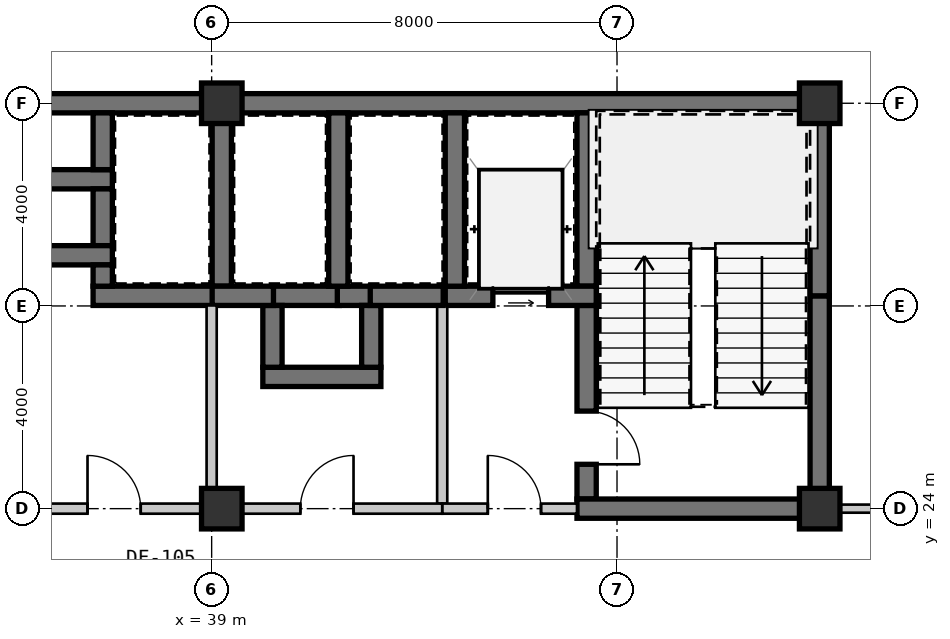
"""IFC4 building model, lengths in metres.
Left out: names, types, materials, properties, quantities, classifications, styles, units other than length and angle.
Written with IfcOpenShell. Run it as: python <this file> out.ifc"""

import sys

from ifc_helpers import new_model, si_unit, direction, frame, frame_2d, origin, origin_2d, place, context, subcontext, project, spatial, rectangle, extrude, source, transform, mapped, element, fill, save


model = new_model("IFC4")
c1 = context("Model", 3, precision=1e-05, world=origin(), true_north=direction((0.0, 1.0)))
c2 = subcontext(c1, "Body", "Model", "MODEL_VIEW")
j1 = project(units=[si_unit("LENGTHUNIT", "METRE"), si_unit("PLANEANGLEUNIT", "RADIAN")], contexts=[c1])
p1 = place(None, origin())
s1 = spatial("IfcSite", under=j1, at=p1, CompositionType="ELEMENT")
p2 = place(p1, origin())
s2 = spatial("IfcBuilding", under=s1, at=p2, CompositionType="ELEMENT")
p3 = place(p2, frame((0.0, 0.0, 38.85)))
s3 = spatial("IfcBuildingStorey", under=s2, at=p3, CompositionType="ELEMENT", Elevation=38.85)
m1 = source(origin(), c2, "Body", "SweptSolid", [
    extrude(rectangle(XDim=0.8, YDim=0.8, at=origin_2d()), origin(), (0.0, 0.0, 1.0), 3.15),
])
for number, where, z_axis, x_axis in (
    (1, (39.2, 24.0, 0.0), (0.0, 0.0, 1.0), (1.0, 0.0, 0.0)),
    (2, (51.0, 24.0, 0.0), (0.0, 0.0, 1.0), (1.0, 0.0, 0.0)),
    (3, (39.2, 32.0, 0.0), (0.0, 0.0, 1.0), (1.0, 0.0, 0.0)),
    (4, (51.0, 32.0, 0.0), (0.0, 0.0, 1.0), (1.0, 0.0, 0.0)),
):
    element("IfcColumn", number, at=place(p3, frame(where, z_axis=z_axis, x_axis=x_axis)), inside=s3, PredefinedType="COLUMN", context=c2, shape_type="MappedRepresentation", body=[
        mapped(m1, transform((0.0, 0.0, 0.0), scale=1.0)),
    ])
m2 = source(origin(), c2, "Body", "SweptSolid", [
    extrude(rectangle(XDim=11.2, YDim=0.38, at=frame_2d((5.6, 0.0))), origin(), (0.0, 0.0, 1.0), 2.93),
])
p4 = place(p3, frame((28.0, 32.0, 0.0), z_axis=(0.0, 0.0, 1.0), x_axis=(1.0, 0.0, 0.0)))
e5 = element("IfcWall", 5, at=p4, inside=s3, PredefinedType="SHEAR", context=c2, shape_type="MappedRepresentation", body=[
    mapped(m2, transform((0.0, 0.0, 0.0), scale=1.0)),
])
m3 = source(origin(), c2, "Body", "SweptSolid", [
    extrude(rectangle(XDim=11.99, YDim=0.38, at=frame_2d((5.995, 0.0))), origin(), (0.0, 0.0, 1.0), 2.93),
])
p5 = place(p3, frame((39.2, 32.0, 0.0), z_axis=(0.0, 0.0, 1.0), x_axis=(1.0, 0.0, 0.0)))
e6 = element("IfcWall", 6, at=p5, inside=s3, PredefinedType="SHEAR", context=c2, shape_type="MappedRepresentation", body=[
    mapped(m3, transform((0.0, 0.0, 0.0), scale=1.0)),
])
m4 = source(origin(), c2, "Body", "SweptSolid", [
    extrude(rectangle(XDim=4.01, YDim=0.38, at=frame_2d((2.005, 0.0))), origin(), (0.0, 0.0, 1.0), 2.93),
])
p6 = place(p3, frame((51.0, 24.19, 0.0), z_axis=(0.0, 0.0, 1.0), x_axis=(0.0, 1.0, 0.0)))
e7 = element("IfcWall", 7, at=p6, inside=s3, PredefinedType="SHEAR", context=c2, shape_type="MappedRepresentation", body=[
    mapped(m4, transform((0.0, 0.0, 0.0), scale=1.0)),
])
m5 = source(origin(), c2, "Body", "SweptSolid", [
    extrude(rectangle(XDim=3.61, YDim=0.38, at=frame_2d((1.805, 0.0))), origin(), (0.0, 0.0, 1.0), 2.93),
])
p7 = place(p3, frame((51.0, 28.2, 0.0), z_axis=(0.0, 0.0, 1.0), x_axis=(0.0, 1.0, 0.0)))
e8 = element("IfcWall", 8, at=p7, inside=s3, PredefinedType="SHEAR", context=c2, shape_type="MappedRepresentation", body=[
    mapped(m5, transform((0.0, 0.0, 0.0), scale=1.0)),
])
m6 = source(origin(), c2, "Body", "SweptSolid", [
    extrude(rectangle(XDim=3.42, YDim=0.38, at=frame_2d((1.71, 0.0))), origin(), (0.0, 0.0, 1.0), 2.93),
])
p8 = place(p3, frame((46.4, 31.81, 0.0), z_axis=(0.0, 0.0, 1.0), x_axis=(0.0, -1.0, 0.0)))
e9 = element("IfcWall", 9, at=p8, inside=s3, PredefinedType="SHEAR", context=c2, shape_type="MappedRepresentation", body=[
    mapped(m6, transform((0.0, 0.0, 0.0), scale=1.0)),
])
m7 = source(origin(), c2, "Body", "SweptSolid", [
    extrude(rectangle(XDim=3.82, YDim=0.38, at=frame_2d((1.91, 0.0))), origin(), (0.0, 0.0, 1.0), 2.93),
])
p9 = place(p3, frame((46.4, 28.01, 0.0), z_axis=(0.0, 0.0, 1.0), x_axis=(0.0, -1.0, 0.0)))
e10 = element("IfcWall", 10, at=p9, inside=s3, PredefinedType="SHEAR", context=c2, shape_type="MappedRepresentation", body=[
    mapped(m7, transform((0.0, 0.0, 0.0), scale=1.0)),
])
m8 = source(origin(), c2, "Body", "SweptSolid", [
    extrude(rectangle(XDim=1.05, YDim=2.1, at=frame_2d((0.525, 1.05))), frame((0.0, 0.2, 0.0), z_axis=(0.0, -1.0, 0.0), x_axis=(1.0, 0.0, 0.0)), (0.0, 0.0, 1.0), 0.4),
])
p10 = place(p9, frame((2.085, 0.0, 0.0)))
e11 = element("IfcOpeningElement", 11, at=p10, cuts=e10, PredefinedType="OPENING", context=c2, shape_type="MappedRepresentation", body=[
    mapped(m8, transform((0.0, 0.0, 0.0), scale=1.0)),
])
m9 = source(origin(), c2, "Body", "SweptSolid", [
    extrude(rectangle(XDim=4.98, YDim=0.38, at=frame_2d((2.49, 0.0))), origin(), (0.0, 0.0, 1.0), 2.93),
])
p11 = place(p3, frame((46.21, 24.0, 0.0), z_axis=(0.0, 0.0, 1.0), x_axis=(1.0, 0.0, 0.0)))
e12 = element("IfcWall", 12, at=p11, inside=s3, PredefinedType="SHEAR", context=c2, shape_type="MappedRepresentation", body=[
    mapped(m9, transform((0.0, 0.0, 0.0), scale=1.0)),
])
m10 = source(origin(), c2, "Body", "SweptSolid", [
    extrude(rectangle(XDim=2.98, YDim=0.38, at=frame_2d((1.49, 0.0))), origin(), (0.0, 0.0, 1.0), 2.93),
])
p12 = place(p3, frame((43.61, 28.2, 0.0), z_axis=(0.0, 0.0, 1.0), x_axis=(1.0, 0.0, 0.0)))
e13 = element("IfcWall", 13, at=p12, inside=s3, PredefinedType="SHEAR", context=c2, shape_type="MappedRepresentation", body=[
    mapped(m10, transform((0.0, 0.0, 0.0), scale=1.0)),
])
m11 = source(origin(), c2, "Body", "SweptSolid", [
    extrude(rectangle(XDim=1.1, YDim=2.15, at=frame_2d((0.55, 1.075))), frame((0.0, 0.2, 0.0), z_axis=(0.0, -1.0, 0.0), x_axis=(1.0, 0.0, 0.0)), (0.0, 0.0, 1.0), 0.4),
])
p13 = place(p12, frame((0.94, 0.0, 0.0)))
e14 = element("IfcOpeningElement", 14, at=p13, cuts=e13, PredefinedType="OPENING", context=c2, shape_type="MappedRepresentation", body=[
    mapped(m11, transform((0.0, 0.0, 0.0), scale=1.0)),
])
p14 = place(p3, frame((43.8, 31.81, 0.0), z_axis=(0.0, 0.0, 1.0), x_axis=(0.0, -1.0, 0.0)))
e15 = element("IfcWall", 15, at=p14, inside=s3, PredefinedType="SHEAR", context=c2, shape_type="MappedRepresentation", body=[
    mapped(m6, transform((0.0, 0.0, 0.0), scale=1.0)),
])
m12 = source(origin(), c2, "Body", "SweptSolid", [
    extrude(rectangle(XDim=3.91, YDim=0.2, at=frame_2d((1.955, 0.0))), origin(), (0.0, 0.0, 1.0), 2.93),
])
p15 = place(p3, frame((43.55, 28.01, 0.0), z_axis=(0.0, 0.0, 1.0), x_axis=(0.0, -1.0, 0.0)))
e16 = element("IfcWall", 16, at=p15, inside=s3, PredefinedType="SOLIDWALL", context=c2, shape_type="MappedRepresentation", body=[
    mapped(m12, transform((0.0, 0.0, 0.0), scale=1.0)),
])
m13 = source(origin(), c2, "Body", "SweptSolid", [
    extrude(rectangle(XDim=2.66, YDim=0.2, at=frame_2d((1.33, 0.0))), origin(), (0.0, 0.0, 1.0), 2.397),
])
p16 = place(p3, frame((43.55, 24.0, 0.0), z_axis=(0.0, 0.0, 1.0), x_axis=(1.0, 0.0, 0.0)))
e17 = element("IfcWall", 17, at=p16, inside=s3, PredefinedType="SOLIDWALL", context=c2, shape_type="MappedRepresentation", body=[
    mapped(m13, transform((0.0, 0.0, 0.0), scale=1.0)),
])
m14 = source(origin(), c2, "Body", "SweptSolid", [
    extrude(rectangle(XDim=1.05, YDim=2.1, at=frame_2d((0.525, 1.05))), frame((0.0, 0.11, 0.0), z_axis=(0.0, -1.0, 0.0), x_axis=(1.0, 0.0, 0.0)), (0.0, 0.0, 1.0), 0.22),
])
p17 = place(p16, frame((0.9, 0.0, 0.0)))
e18 = element("IfcOpeningElement", 18, at=p17, cuts=e17, PredefinedType="OPENING", context=c2, shape_type="MappedRepresentation", body=[
    mapped(m14, transform((0.0, 0.0, 0.0), scale=1.0)),
])
m15 = source(origin(), c2, "Body", "SweptSolid", [
    extrude(rectangle(XDim=2.08, YDim=0.38, at=frame_2d((1.04, 0.0))), origin(), (0.0, 0.0, 1.0), 2.93),
])
p18 = place(p3, frame((34.96, 30.5, 0.0), z_axis=(0.0, 0.0, 1.0), x_axis=(1.0, 0.0, 0.0)))
e19 = element("IfcWall", 19, at=p18, inside=s3, PredefinedType="SHEAR", context=c2, shape_type="MappedRepresentation", body=[
    mapped(m15, transform((0.0, 0.0, 0.0), scale=1.0)),
])
m16 = source(origin(), c2, "Body", "SweptSolid", [
    extrude(rectangle(XDim=1.12, YDim=0.38, at=frame_2d((0.56, 0.0))), origin(), (0.0, 0.0, 1.0), 2.93),
])
for number, where, z_axis, x_axis in (
    (20, (36.85, 30.69, 0.0), (0.0, 0.0, 1.0), (0.0, 1.0, 0.0)),
    (21, (36.85, 29.19, 0.0), (0.0, 0.0, 1.0), (0.0, 1.0, 0.0)),
):
    element("IfcWall", number, at=place(p3, frame(where, z_axis=z_axis, x_axis=x_axis)), inside=s3, PredefinedType="SHEAR", context=c2, shape_type="MappedRepresentation", body=[
        mapped(m16, transform((0.0, 0.0, 0.0), scale=1.0)),
    ])
p19 = place(p3, frame((34.96, 29.0, 0.0), z_axis=(0.0, 0.0, 1.0), x_axis=(1.0, 0.0, 0.0)))
e22 = element("IfcWall", 22, at=p19, inside=s3, PredefinedType="SHEAR", context=c2, shape_type="MappedRepresentation", body=[
    mapped(m15, transform((0.0, 0.0, 0.0), scale=1.0)),
])
m17 = source(origin(), c2, "Body", "SweptSolid", [
    extrude(rectangle(XDim=1.32, YDim=0.38, at=frame_2d((0.66, 0.0))), origin(), (0.0, 0.0, 1.0), 2.93),
])
p20 = place(p3, frame((41.52, 28.2, 0.0), z_axis=(0.0, 0.0, 1.0), x_axis=(-1.0, 0.0, 0.0)))
e23 = element("IfcWall", 23, at=p20, inside=s3, PredefinedType="SHEAR", context=c2, shape_type="MappedRepresentation", body=[
    mapped(m17, transform((0.0, 0.0, 0.0), scale=1.0)),
])
m18 = source(origin(), c2, "Body", "SweptSolid", [
    extrude(rectangle(XDim=0.67, YDim=0.38, at=frame_2d((0.335, 0.0))), origin(), (0.0, 0.0, 1.0), 2.93),
])
p21 = place(p3, frame((42.15, 28.2, 0.0), z_axis=(0.0, 0.0, 1.0), x_axis=(-1.0, 0.0, 0.0)))
e24 = element("IfcWall", 24, at=p21, inside=s3, PredefinedType="SHEAR", context=c2, shape_type="MappedRepresentation", body=[
    mapped(m18, transform((0.0, 0.0, 0.0), scale=1.0)),
])
m19 = source(origin(), c2, "Body", "SweptSolid", [
    extrude(rectangle(XDim=2.33, YDim=0.38, at=frame_2d((1.165, 0.0))), origin(), (0.0, 0.0, 1.0), 2.93),
])
p22 = place(p3, frame((40.01, 26.6, 0.0), z_axis=(0.0, 0.0, 1.0), x_axis=(1.0, 0.0, 0.0)))
e25 = element("IfcWall", 25, at=p22, inside=s3, PredefinedType="SHEAR", context=c2, shape_type="MappedRepresentation", body=[
    mapped(m19, transform((0.0, 0.0, 0.0), scale=1.0)),
])
m20 = source(origin(), c2, "Body", "SweptSolid", [
    extrude(rectangle(XDim=1.22, YDim=0.38, at=frame_2d((0.61, 0.0))), origin(), (0.0, 0.0, 1.0), 2.93),
])
for number, where, z_axis, x_axis in (
    (26, (40.2, 28.01, 0.0), (0.0, 0.0, 1.0), (0.0, -1.0, 0.0)),
    (27, (42.15, 26.79, 0.0), (0.0, 0.0, 1.0), (0.0, 1.0, 0.0)),
):
    element("IfcWall", number, at=place(p3, frame(where, z_axis=z_axis, x_axis=x_axis)), inside=s3, PredefinedType="SHEAR", context=c2, shape_type="MappedRepresentation", body=[
        mapped(m20, transform((0.0, 0.0, 0.0), scale=1.0)),
    ])
p23 = place(p3, frame((39.2, 28.39, 0.0), z_axis=(0.0, 0.0, 1.0), x_axis=(0.0, 1.0, 0.0)))
e28 = element("IfcWall", 28, at=p23, inside=s3, PredefinedType="SHEAR", context=c2, shape_type="MappedRepresentation", body=[
    mapped(m6, transform((0.0, 0.0, 0.0), scale=1.0)),
])
m21 = source(origin(), c2, "Body", "SweptSolid", [
    extrude(rectangle(XDim=2.36, YDim=0.38, at=frame_2d((1.18, 0.0))), origin(), (0.0, 0.0, 1.0), 2.93),
])
p24 = place(p3, frame((36.66, 28.2, 0.0), z_axis=(0.0, 0.0, 1.0), x_axis=(1.0, 0.0, 0.0)))
e29 = element("IfcWall", 29, at=p24, inside=s3, PredefinedType="SHEAR", context=c2, shape_type="MappedRepresentation", body=[
    mapped(m21, transform((0.0, 0.0, 0.0), scale=1.0)),
])
m22 = source(origin(), c2, "Body", "SweptSolid", [
    extrude(rectangle(XDim=0.42, YDim=0.38, at=frame_2d((0.21, 0.0))), origin(), (0.0, 0.0, 1.0), 2.93),
])
p25 = place(p3, frame((36.85, 28.81, 0.0), z_axis=(0.0, 0.0, 1.0), x_axis=(0.0, -1.0, 0.0)))
e30 = element("IfcWall", 30, at=p25, inside=s3, PredefinedType="SHEAR", context=c2, shape_type="MappedRepresentation", body=[
    mapped(m22, transform((0.0, 0.0, 0.0), scale=1.0)),
])
p26 = place(p3, frame((41.5, 28.39, 0.0), z_axis=(0.0, 0.0, 1.0), x_axis=(0.0, 1.0, 0.0)))
e31 = element("IfcWall", 31, at=p26, inside=s3, PredefinedType="SHEAR", context=c2, shape_type="MappedRepresentation", body=[
    mapped(m6, transform((0.0, 0.0, 0.0), scale=1.0)),
])
m23 = source(origin(), c2, "Body", "SweptSolid", [
    extrude(rectangle(XDim=1.21, YDim=0.38, at=frame_2d((0.605, 0.0))), origin(), (0.0, 0.0, 1.0), 2.93),
])
p27 = place(p3, frame((39.01, 28.2, 0.0), z_axis=(0.0, 0.0, 1.0), x_axis=(1.0, 0.0, 0.0)))
e32 = element("IfcWall", 32, at=p27, inside=s3, PredefinedType="SHEAR", context=c2, shape_type="MappedRepresentation", body=[
    mapped(m23, transform((0.0, 0.0, 0.0), scale=1.0)),
])
m24 = source(origin(), c2, "Body", "SweptSolid", [
    extrude(rectangle(XDim=1.44, YDim=0.38, at=frame_2d((0.72, 0.0))), origin(), (0.0, 0.0, 1.0), 2.93),
])
p28 = place(p3, frame((42.13, 28.2, 0.0), z_axis=(0.0, 0.0, 1.0), x_axis=(1.0, 0.0, 0.0)))
e33 = element("IfcWall", 33, at=p28, inside=s3, PredefinedType="SHEAR", context=c2, shape_type="MappedRepresentation", body=[
    mapped(m24, transform((0.0, 0.0, 0.0), scale=1.0)),
])
p29 = place(p3, frame((39.0, 28.01, 0.0), z_axis=(0.0, 0.0, 1.0), x_axis=(0.0, -1.0, 0.0)))
e34 = element("IfcWall", 34, at=p29, inside=s3, PredefinedType="SOLIDWALL", context=c2, shape_type="MappedRepresentation", body=[
    mapped(m12, transform((0.0, 0.0, 0.0), scale=1.0)),
])
m25 = source(origin(), c2, "Body", "SweptSolid", [
    extrude(rectangle(XDim=3.85, YDim=0.2, at=frame_2d((1.925, 0.0))), origin(), (0.0, 0.0, 1.0), 2.47),
])
p30 = place(p3, frame((39.0, 24.0, 0.0), z_axis=(0.0, 0.0, 1.0), x_axis=(-1.0, 0.0, 0.0)))
e35 = element("IfcWall", 35, at=p30, inside=s3, PredefinedType="SOLIDWALL", context=c2, shape_type="MappedRepresentation", body=[
    mapped(m25, transform((0.0, 0.0, 0.0), scale=1.0)),
])
p31 = place(p30, frame((1.4, 0.0, 0.0)))
e36 = element("IfcOpeningElement", 36, at=p31, cuts=e35, PredefinedType="OPENING", context=c2, shape_type="MappedRepresentation", body=[
    mapped(m14, transform((0.0, 0.0, 0.0), scale=1.0)),
])
m26 = source(origin(), c2, "Body", "SweptSolid", [
    extrude(rectangle(XDim=4.55, YDim=0.2, at=frame_2d((2.275, 0.0))), origin(), (0.0, 0.0, 1.0), 2.397),
])
p32 = place(p3, frame((43.55, 24.0, 0.0), z_axis=(0.0, 0.0, 1.0), x_axis=(-1.0, 0.0, 0.0)))
e37 = element("IfcWall", 37, at=p32, inside=s3, PredefinedType="SOLIDWALL", context=c2, shape_type="MappedRepresentation", body=[
    mapped(m26, transform((0.0, 0.0, 0.0), scale=1.0)),
])
p33 = place(p32, frame((1.75, 0.0, 0.0)))
e38 = element("IfcOpeningElement", 38, at=p33, cuts=e37, PredefinedType="OPENING", context=c2, shape_type="MappedRepresentation", body=[
    mapped(m14, transform((0.0, 0.0, 0.0), scale=1.0)),
])
m27 = source(origin(), c2, "Body", "SweptSolid", [
    extrude(rectangle(XDim=4.13, YDim=0.16, at=frame_2d((2.065, 0.0))), origin(), (0.0, 0.0, 1.0), 2.93),
])
p34 = place(p3, frame((51.19, 24.0, 0.0), z_axis=(0.0, 0.0, 1.0), x_axis=(1.0, 0.0, 0.0)))
e39 = element("IfcWall", 39, at=p34, inside=s3, PredefinedType="PARTITIONING", context=c2, shape_type="MappedRepresentation", body=[
    mapped(m27, transform((0.0, 0.0, 0.0), scale=1.0)),
])
m28 = source(origin(), c2, "Body", "SweptSolid", [
    extrude(rectangle(XDim=1.05, YDim=2.1, at=frame_2d((0.525, 1.05))), frame((0.0, 0.025, 0.0), z_axis=(0.0, -1.0, 0.0), x_axis=(1.0, 0.0, 0.0)), (0.0, 0.0, 1.0), 0.05),
])
p35 = place(p10, origin())
e40 = element("IfcDoor", 40, at=p35, inside=s3, OperationType="SINGLE_SWING_RIGHT", PredefinedType="DOOR", context=c2, shape_type="MappedRepresentation", body=[
    mapped(m28, transform((0.0, 0.0, 0.0), scale=1.0)),
])
fill(e11, e40)
m29 = source(origin(), c2, "Body", "SweptSolid", [
    extrude(rectangle(XDim=1.1, YDim=2.15, at=frame_2d((0.55, 1.075))), frame((0.0, 0.025, 0.0), z_axis=(0.0, -1.0, 0.0), x_axis=(1.0, 0.0, 0.0)), (0.0, 0.0, 1.0), 0.05),
])
p36 = place(p13, origin())
e41 = element("IfcDoor", 41, at=p36, inside=s3, OperationType="SLIDING_TO_LEFT", PredefinedType="DOOR", context=c2, shape_type="MappedRepresentation", body=[
    mapped(m29, transform((0.0, 0.0, 0.0), scale=1.0)),
])
fill(e14, e41)
p37 = place(p17, origin())
e42 = element("IfcDoor", 42, at=p37, inside=s3, OperationType="SINGLE_SWING_LEFT", PredefinedType="DOOR", context=c2, shape_type="MappedRepresentation", body=[
    mapped(m28, transform((0.0, 0.0, 0.0), scale=1.0)),
])
fill(e18, e42)
p38 = place(p31, frame((1.05, 0.0, 0.0), z_axis=(0.0, 0.0, 1.0), x_axis=(-1.0, 0.0, 0.0)))
e43 = element("IfcDoor", 43, at=p38, inside=s3, OperationType="SINGLE_SWING_LEFT", PredefinedType="DOOR", context=c2, shape_type="MappedRepresentation", body=[
    mapped(m28, transform((0.0, 0.0, 0.0), scale=1.0)),
])
fill(e36, e43)
p39 = place(p33, frame((1.05, 0.0, 0.0), z_axis=(0.0, 0.0, 1.0), x_axis=(-1.0, 0.0, 0.0)))
e44 = element("IfcDoor", 44, at=p39, inside=s3, OperationType="SINGLE_SWING_RIGHT", PredefinedType="DOOR", context=c2, shape_type="MappedRepresentation", body=[
    mapped(m28, transform((0.0, 0.0, 0.0), scale=1.0)),
])
fill(e38, e44)
save(model, sys.argv[1])
